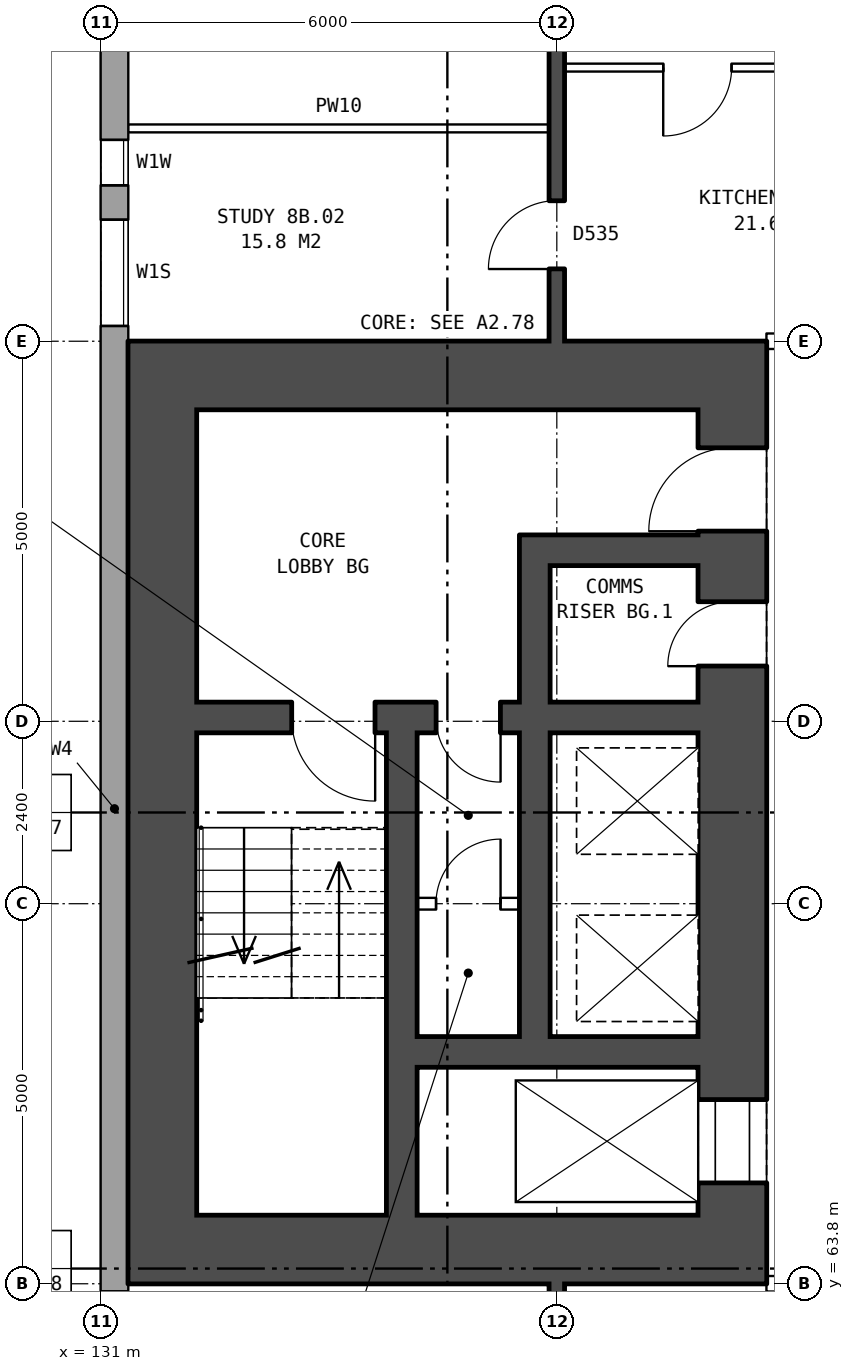
"""IFC4 building model, lengths in metres.
Left out: names, types, materials, properties, quantities, classifications, styles, units other than length and angle.
Written with IfcOpenShell. Run it as: python <this file> out.ifc"""

import sys

from ifc_helpers import new_model, si_unit, direction, frame, frame_2d, origin, place, context, subcontext, project, spatial, rectangle, extrude, element, fill, save


model = new_model("IFC4")
c1 = context("Model", 3, precision=1e-05, world=origin(), true_north=direction((0.0, 1.0)))
c2 = subcontext(c1, "Body", "Model", "MODEL_VIEW")
j1 = project(units=[si_unit("LENGTHUNIT", "METRE"), si_unit("PLANEANGLEUNIT", "RADIAN")], contexts=[c1])
p1 = place(None, origin())
s1 = spatial("IfcSite", under=j1, at=p1, CompositionType="ELEMENT")
p2 = place(p1, origin())
s2 = spatial("IfcBuilding", under=s1, at=p2, CompositionType="ELEMENT")
p3 = place(p2, frame((0.0, 0.0, 31.9)))
s3 = spatial("IfcBuildingStorey", under=s2, at=p3, CompositionType="ELEMENT", Elevation=31.9)
p4 = place(p3, frame((131.18, 82.925, 0.0), z_axis=(0.0, 0.0, 1.0), x_axis=(0.0, -1.0, 0.0)))
e1 = element("IfcWall", 1, at=p4, inside=s3, PredefinedType="STANDARD", context=c2, shape_type="SweptSolid", body=[
    extrude(rectangle(XDim=25.851, YDim=0.36, at=frame_2d((12.925, 0.0))), origin(), (0.0, 0.0, 1.0), 2.85),
])
p5 = place(p4, frame((0.3, 0.0, 0.8)))
e2 = element("IfcOpeningElement", 2, at=p5, cuts=e1, PredefinedType="OPENING", context=c2, shape_type="SweptSolid", body=[
    extrude(rectangle(XDim=1.4, YDim=1.8, at=frame_2d((0.7, 0.9))), frame((0.0, 0.19, 0.0), z_axis=(0.0, -1.0, 0.0), x_axis=(1.0, 0.0, 0.0)), (0.0, 0.0, 1.0), 0.38),
])
p6 = place(p4, frame((4.075, 0.0, 0.25)))
e3 = element("IfcOpeningElement", 3, at=p6, cuts=e1, PredefinedType="OPENING", context=c2, shape_type="SweptSolid", body=[
    extrude(rectangle(XDim=0.6, YDim=0.9, at=frame_2d((0.3, 0.45))), frame((0.0, 0.19, 0.0), z_axis=(0.0, -1.0, 0.0), x_axis=(1.0, 0.0, 0.0)), (0.0, 0.0, 1.0), 0.38),
])
p7 = place(p4, frame((19.225, 0.0, 1.6)))
e4 = element("IfcOpeningElement", 4, at=p7, cuts=e1, PredefinedType="OPENING", context=c2, shape_type="SweptSolid", body=[
    extrude(rectangle(XDim=1.4, YDim=0.9, at=frame_2d((0.7, 0.45))), frame((0.0, 0.19, 0.0), z_axis=(0.0, -1.0, 0.0), x_axis=(1.0, 0.0, 0.0)), (0.0, 0.0, 1.0), 0.38),
])
p8 = place(p4, frame((22.025, 0.0, 0.8)))
e5 = element("IfcOpeningElement", 5, at=p8, cuts=e1, PredefinedType="OPENING", context=c2, shape_type="SweptSolid", body=[
    extrude(rectangle(XDim=1.2, YDim=0.9, at=frame_2d((0.6, 0.45))), frame((0.0, 0.19, 0.0), z_axis=(0.0, -1.0, 0.0), x_axis=(1.0, 0.0, 0.0)), (0.0, 0.0, 1.0), 0.38),
])
p9 = place(p4, frame((2.0, 0.0, 0.8)))
e6 = element("IfcOpeningElement", 6, at=p9, cuts=e1, PredefinedType="OPENING", context=c2, shape_type="SweptSolid", body=[
    extrude(rectangle(XDim=0.8, YDim=1.5, at=frame_2d((0.4, 0.75))), frame((0.0, 0.19, 0.0), z_axis=(0.0, -1.0, 0.0), x_axis=(1.0, 0.0, 0.0)), (0.0, 0.0, 1.0), 0.38),
])
p10 = place(p4, frame((5.125, 0.0, 1.65)))
e7 = element("IfcOpeningElement", 7, at=p10, cuts=e1, PredefinedType="OPENING", context=c2, shape_type="SweptSolid", body=[
    extrude(rectangle(XDim=1.4, YDim=0.9, at=frame_2d((0.7, 0.45))), frame((0.0, 0.19, 0.0), z_axis=(0.0, -1.0, 0.0), x_axis=(1.0, 0.0, 0.0)), (0.0, 0.0, 1.0), 0.38),
])
p11 = place(p4, frame((23.575, 0.0, 0.8)))
e8 = element("IfcOpeningElement", 8, at=p11, cuts=e1, PredefinedType="OPENING", context=c2, shape_type="SweptSolid", body=[
    extrude(rectangle(XDim=1.2, YDim=1.8, at=frame_2d((0.6, 0.9))), frame((0.0, 0.19, 0.0), z_axis=(0.0, -1.0, 0.0), x_axis=(1.0, 0.0, 0.0)), (0.0, 0.0, 1.0), 0.38),
])
p12 = place(p3, frame((139.31, 64.7, 0.0), z_axis=(0.0, 0.0, 1.0), x_axis=(0.0, 1.0, 0.0)))
e9 = element("IfcWall", 9, at=p12, inside=s3, PredefinedType="SHEAR", context=c2, shape_type="SweptSolid", body=[
    extrude(rectangle(XDim=10.6, YDim=0.9, at=frame_2d((5.3, 0.0))), origin(), (0.0, 0.0, 1.0), 2.85),
])
p13 = place(p12, frame((0.425, 0.0, 0.0)))
e10 = element("IfcOpeningElement", 10, at=p13, cuts=e9, PredefinedType="OPENING", context=c2, shape_type="SweptSolid", body=[
    extrude(rectangle(XDim=1.1, YDim=2.1, at=frame_2d((0.55, 1.05))), frame((0.0, 0.46, 0.0), z_axis=(0.0, -1.0, 0.0), x_axis=(1.0, 0.0, 0.0)), (0.0, 0.0, 1.0), 0.92),
])
p14 = place(p12, frame((9.0, 0.0, 0.0)))
e11 = element("IfcOpeningElement", 11, at=p14, cuts=e9, PredefinedType="OPENING", context=c2, shape_type="SweptSolid", body=[
    extrude(rectangle(XDim=1.1, YDim=2.1, at=frame_2d((0.55, 1.05))), frame((0.0, 0.46, 0.0), z_axis=(0.0, -1.0, 0.0), x_axis=(1.0, 0.0, 0.0)), (0.0, 0.0, 1.0), 0.92),
])
p15 = place(p12, frame((7.225, 0.0, 0.0)))
e12 = element("IfcOpeningElement", 12, at=p15, cuts=e9, PredefinedType="OPENING", context=c2, shape_type="SweptSolid", body=[
    extrude(rectangle(XDim=0.85, YDim=2.1, at=frame_2d((0.425, 1.05))), frame((0.0, 0.46, 0.0), z_axis=(0.0, -1.0, 0.0), x_axis=(1.0, 0.0, 0.0)), (0.0, 0.0, 1.0), 0.92),
])
p16 = place(p3, frame((131.81, 64.7, 0.0), z_axis=(0.0, 0.0, 1.0), x_axis=(0.0, 1.0, 0.0)))
e13 = element("IfcWall", 13, at=p16, inside=s3, PredefinedType="SHEAR", context=c2, shape_type="SweptSolid", body=[
    extrude(rectangle(XDim=10.6, YDim=0.9, at=frame_2d((5.3, 0.0))), origin(), (0.0, 0.0, 1.0), 2.85),
])
for number, where, z_axis, x_axis in (
    (14, (139.76, 64.25, 0.0), (0.0, 0.0, 1.0), (-1.0, 0.0, 0.0)),
    (15, (139.76, 75.75, 0.0), (0.0, 0.0, 1.0), (-1.0, 0.0, 0.0)),
):
    element("IfcWall", number, at=place(p3, frame(where, z_axis=z_axis, x_axis=x_axis)), inside=s3, PredefinedType="SHEAR", context=c2, shape_type="SweptSolid", body=[
        extrude(rectangle(XDim=8.4, YDim=0.9, at=frame_2d((4.2, 0.0))), origin(), (0.0, 0.0, 1.0), 2.85),
    ])
p17 = place(p3, frame((138.86, 66.85, 0.0), z_axis=(0.0, 0.0, 1.0), x_axis=(-1.0, 0.0, 0.0)))
e16 = element("IfcWall", 16, at=p17, inside=s3, PredefinedType="SHEAR", context=c2, shape_type="SweptSolid", body=[
    extrude(rectangle(XDim=3.7, YDim=0.4, at=frame_2d((1.85, 0.0))), origin(), (0.0, 0.0, 1.0), 2.85),
])
p18 = place(p3, frame((136.51, 68.8, 0.0), z_axis=(0.0, 0.0, 1.0), x_axis=(-1.0, 0.0, 0.0)))
e17 = element("IfcWall", 17, at=p18, inside=s3, PredefinedType="PARTITIONING", context=c2, shape_type="SweptSolid", body=[
    extrude(rectangle(XDim=1.35, YDim=0.15, at=frame_2d((0.675, 0.0))), origin(), (0.0, 0.0, 1.0), 2.85),
])
p19 = place(p18, frame((0.25, 0.0, 0.0)))
e18 = element("IfcOpeningElement", 18, at=p19, cuts=e17, PredefinedType="OPENING", context=c2, shape_type="SweptSolid", body=[
    extrude(rectangle(XDim=0.85, YDim=2.1, at=frame_2d((0.425, 1.05))), frame((0.0, 0.085, 0.0), z_axis=(0.0, -1.0, 0.0), x_axis=(1.0, 0.0, 0.0)), (0.0, 0.0, 1.0), 0.17),
])
p20 = place(p3, frame((138.86, 71.25, 0.0), z_axis=(0.0, 0.0, 1.0), x_axis=(-1.0, 0.0, 0.0)))
e19 = element("IfcWall", 19, at=p20, inside=s3, PredefinedType="SHEAR", context=c2, shape_type="SweptSolid", body=[
    extrude(rectangle(XDim=6.6, YDim=0.4, at=frame_2d((3.3, 0.0))), origin(), (0.0, 0.0, 1.0), 2.85),
])
p21 = place(p20, frame((4.25, 0.0, 0.0)))
e20 = element("IfcOpeningElement", 20, at=p21, cuts=e19, PredefinedType="OPENING", context=c2, shape_type="SweptSolid", body=[
    extrude(rectangle(XDim=1.1, YDim=2.1, at=frame_2d((0.55, 1.05))), frame((0.0, 0.21, 0.0), z_axis=(0.0, -1.0, 0.0), x_axis=(1.0, 0.0, 0.0)), (0.0, 0.0, 1.0), 0.42),
])
p22 = place(p20, frame((2.6, 0.0, 0.0)))
e21 = element("IfcOpeningElement", 21, at=p22, cuts=e19, PredefinedType="OPENING", context=c2, shape_type="SweptSolid", body=[
    extrude(rectangle(XDim=0.85, YDim=2.1, at=frame_2d((0.425, 1.05))), frame((0.0, 0.21, 0.0), z_axis=(0.0, -1.0, 0.0), x_axis=(1.0, 0.0, 0.0)), (0.0, 0.0, 1.0), 0.42),
])
p23 = place(p3, frame((138.86, 73.45, 0.0), z_axis=(0.0, 0.0, 1.0), x_axis=(-1.0, 0.0, 0.0)))
e22 = element("IfcWall", 22, at=p23, inside=s3, PredefinedType="SHEAR", context=c2, shape_type="SweptSolid", body=[
    extrude(rectangle(XDim=1.95, YDim=0.4, at=frame_2d((0.975, 0.0))), origin(), (0.0, 0.0, 1.0), 2.85),
])
p24 = place(p3, frame((136.71, 67.05, 0.0), z_axis=(0.0, 0.0, 1.0), x_axis=(0.0, 1.0, 0.0)))
e23 = element("IfcWall", 23, at=p24, inside=s3, PredefinedType="SHEAR", context=c2, shape_type="SweptSolid", body=[
    extrude(rectangle(XDim=4.0, YDim=0.4, at=frame_2d((2.0, 0.0))), origin(), (0.0, 0.0, 1.0), 2.85),
])
p25 = place(p3, frame((136.71, 71.45, 0.0), z_axis=(0.0, 0.0, 1.0), x_axis=(0.0, 1.0, 0.0)))
e24 = element("IfcWall", 24, at=p25, inside=s3, PredefinedType="SHEAR", context=c2, shape_type="SweptSolid", body=[
    extrude(rectangle(XDim=2.2, YDim=0.4, at=frame_2d((1.1, 0.0))), origin(), (0.0, 0.0, 1.0), 2.85),
])
p26 = place(p3, frame((134.96, 64.7, 0.0), z_axis=(0.0, 0.0, 1.0), x_axis=(0.0, 1.0, 0.0)))
e25 = element("IfcWall", 25, at=p26, inside=s3, PredefinedType="SHEAR", context=c2, shape_type="SweptSolid", body=[
    extrude(rectangle(XDim=6.35, YDim=0.4, at=frame_2d((3.175, 0.0))), origin(), (0.0, 0.0, 1.0), 2.85),
])
p27 = place(p3, frame((139.76, 63.8, 0.0), z_axis=(0.0, 0.0, 1.0), x_axis=(1.0, 0.0, 0.0)))
e26 = element("IfcWall", 26, at=p27, inside=s3, PredefinedType="PARTITIONING", context=c2, shape_type="SweptSolid", body=[
    extrude(rectangle(XDim=3.0, YDim=0.2, at=frame_2d((1.5, 0.0))), origin(), (0.0, 0.0, 1.0), 2.85),
])
p28 = place(p27, frame((1.0, 0.0, 0.0)))
e27 = element("IfcOpeningElement", 27, at=p28, cuts=e26, PredefinedType="OPENING", context=c2, shape_type="SweptSolid", body=[
    extrude(rectangle(XDim=1.0, YDim=2.1, at=frame_2d((0.5, 1.05))), frame((0.0, 0.11, 0.0), z_axis=(0.0, -1.0, 0.0), x_axis=(1.0, 0.0, 0.0)), (0.0, 0.0, 1.0), 0.22),
])
p29 = place(p3, frame((139.76, 76.2, 0.0), z_axis=(0.0, 0.0, 1.0), x_axis=(1.0, 0.0, 0.0)))
e28 = element("IfcWall", 28, at=p29, inside=s3, PredefinedType="PARTITIONING", context=c2, shape_type="SweptSolid", body=[
    extrude(rectangle(XDim=3.0, YDim=0.2, at=frame_2d((1.5, 0.0))), origin(), (0.0, 0.0, 1.0), 2.85),
])
p30 = place(p29, frame((1.0, 0.0, 0.0)))
e29 = element("IfcOpeningElement", 29, at=p30, cuts=e28, PredefinedType="OPENING", context=c2, shape_type="SweptSolid", body=[
    extrude(rectangle(XDim=1.0, YDim=2.1, at=frame_2d((0.5, 1.05))), frame((0.0, 0.11, 0.0), z_axis=(0.0, -1.0, 0.0), x_axis=(1.0, 0.0, 0.0)), (0.0, 0.0, 1.0), 0.22),
])
p31 = place(p3, frame((131.36, 79.0, 0.0), z_axis=(0.0, 0.0, 1.0), x_axis=(1.0, 0.0, 0.0)))
e30 = element("IfcWall", 30, at=p31, inside=s3, PredefinedType="PARTITIONING", context=c2, shape_type="SweptSolid", body=[
    extrude(rectangle(XDim=5.54, YDim=0.1, at=frame_2d((2.77, 0.0))), origin(), (0.0, 0.0, 1.0), 2.85),
])
p32 = place(p3, frame((137.1, 79.8, 0.0), z_axis=(0.0, 0.0, 1.0), x_axis=(1.0, 0.0, 0.0)))
e31 = element("IfcWall", 31, at=p32, inside=s3, PredefinedType="PARTITIONING", context=c2, shape_type="SweptSolid", body=[
    extrude(rectangle(XDim=5.8, YDim=0.1, at=frame_2d((2.9, 0.0))), origin(), (0.0, 0.0, 1.0), 2.85),
])
p33 = place(p32, frame((1.3, 0.0, 0.0)))
e32 = element("IfcOpeningElement", 32, at=p33, cuts=e31, PredefinedType="OPENING", context=c2, shape_type="SweptSolid", body=[
    extrude(rectangle(XDim=0.9, YDim=2.1, at=frame_2d((0.45, 1.05))), frame((0.0, 0.06, 0.0), z_axis=(0.0, -1.0, 0.0), x_axis=(1.0, 0.0, 0.0)), (0.0, 0.0, 1.0), 0.12),
])
p34 = place(p32, frame((4.2, 0.0, 0.0)))
e33 = element("IfcOpeningElement", 33, at=p34, cuts=e31, PredefinedType="OPENING", context=c2, shape_type="SweptSolid", body=[
    extrude(rectangle(XDim=0.9, YDim=2.1, at=frame_2d((0.45, 1.05))), frame((0.0, 0.06, 0.0), z_axis=(0.0, -1.0, 0.0), x_axis=(1.0, 0.0, 0.0)), (0.0, 0.0, 1.0), 0.12),
])
p35 = place(p3, frame((137.0, 54.36, 0.0), z_axis=(0.0, 0.0, 1.0), x_axis=(0.0, 1.0, 0.0)))
e34 = element("IfcWall", 34, at=p35, inside=s3, PredefinedType="SOLIDWALL", context=c2, shape_type="SweptSolid", body=[
    extrude(rectangle(XDim=9.44, YDim=0.2, at=frame_2d((4.72, 0.0))), origin(), (0.0, 0.0, 1.0), 2.85),
])
p36 = place(p35, frame((7.04, 0.0, 0.0)))
e35 = element("IfcOpeningElement", 35, at=p36, cuts=e34, PredefinedType="OPENING", context=c2, shape_type="SweptSolid", body=[
    extrude(rectangle(XDim=0.9, YDim=2.1, at=frame_2d((0.45, 1.05))), frame((0.0, 0.11, 0.0), z_axis=(0.0, -1.0, 0.0), x_axis=(1.0, 0.0, 0.0)), (0.0, 0.0, 1.0), 0.22),
])
p37 = place(p3, frame((137.0, 76.2, 0.0), z_axis=(0.0, 0.0, 1.0), x_axis=(0.0, 1.0, 0.0)))
e36 = element("IfcWall", 36, at=p37, inside=s3, PredefinedType="SOLIDWALL", context=c2, shape_type="SweptSolid", body=[
    extrude(rectangle(XDim=9.44, YDim=0.2, at=frame_2d((4.72, 0.0))), origin(), (0.0, 0.0, 1.0), 2.85),
])
p38 = place(p37, frame((6.07, 0.0, 0.0)))
e37 = element("IfcOpeningElement", 37, at=p38, cuts=e36, PredefinedType="OPENING", context=c2, shape_type="SweptSolid", body=[
    extrude(rectangle(XDim=0.9, YDim=2.1, at=frame_2d((0.45, 1.05))), frame((0.0, 0.11, 0.0), z_axis=(0.0, -1.0, 0.0), x_axis=(1.0, 0.0, 0.0)), (0.0, 0.0, 1.0), 0.22),
])
p39 = place(p37, frame((0.95, 0.0, 0.0)))
e38 = element("IfcOpeningElement", 38, at=p39, cuts=e36, PredefinedType="OPENING", context=c2, shape_type="SweptSolid", body=[
    extrude(rectangle(XDim=0.9, YDim=2.1, at=frame_2d((0.45, 1.05))), frame((0.0, 0.11, 0.0), z_axis=(0.0, -1.0, 0.0), x_axis=(1.0, 0.0, 0.0)), (0.0, 0.0, 1.0), 0.22),
])
p40 = place(p6, origin())
e39 = element("IfcWindow", 39, at=p40, inside=s3, PartitioningType="SINGLE_PANEL", PredefinedType="WINDOW", context=c2, shape_type="SweptSolid", body=[
    extrude(rectangle(XDim=0.6, YDim=0.9, at=frame_2d((0.3, 0.45))), frame((0.0, 0.15, 0.0), z_axis=(0.0, -1.0, 0.0), x_axis=(1.0, 0.0, 0.0)), (0.0, 0.0, 1.0), 0.06),
])
fill(e3, e39)
p41 = place(p13, origin())
e40 = element("IfcDoor", 40, at=p41, inside=s3, OperationType="DOUBLE_DOOR_SLIDING", PredefinedType="DOOR", context=c2, shape_type="SweptSolid", body=[
    extrude(rectangle(XDim=1.1, YDim=2.1, at=frame_2d((0.55, 1.05))), frame((0.0, 0.435, 0.0), z_axis=(0.0, -1.0, 0.0), x_axis=(1.0, 0.0, 0.0)), (0.0, 0.0, 1.0), 0.05),
])
fill(e10, e40)
p42 = place(p14, origin())
e41 = element("IfcDoor", 41, at=p42, inside=s3, OperationType="SINGLE_SWING_LEFT", PredefinedType="DOOR", context=c2, shape_type="SweptSolid", body=[
    extrude(rectangle(XDim=1.1, YDim=2.1, at=frame_2d((0.55, 1.05))), frame((0.0, 0.435, 0.0), z_axis=(0.0, -1.0, 0.0), x_axis=(1.0, 0.0, 0.0)), (0.0, 0.0, 1.0), 0.05),
])
fill(e11, e41)
p43 = place(p21, origin())
e42 = element("IfcDoor", 42, at=p43, inside=s3, OperationType="SINGLE_SWING_LEFT", PredefinedType="DOOR", context=c2, shape_type="SweptSolid", body=[
    extrude(rectangle(XDim=1.1, YDim=2.1, at=frame_2d((0.55, 1.05))), frame((0.0, 0.025, 0.0), z_axis=(0.0, -1.0, 0.0), x_axis=(1.0, 0.0, 0.0)), (0.0, 0.0, 1.0), 0.05),
])
fill(e20, e42)
p44 = place(p15, origin())
e43 = element("IfcDoor", 43, at=p44, inside=s3, OperationType="SINGLE_SWING_LEFT", PredefinedType="DOOR", context=c2, shape_type="SweptSolid", body=[
    extrude(rectangle(XDim=0.85, YDim=2.1, at=frame_2d((0.425, 1.05))), frame((0.0, 0.435, 0.0), z_axis=(0.0, -1.0, 0.0), x_axis=(1.0, 0.0, 0.0)), (0.0, 0.0, 1.0), 0.05),
])
fill(e12, e43)
p45 = place(p22, origin())
e44 = element("IfcDoor", 44, at=p45, inside=s3, OperationType="SINGLE_SWING_LEFT", PredefinedType="DOOR", context=c2, shape_type="SweptSolid", body=[
    extrude(rectangle(XDim=0.85, YDim=2.1, at=frame_2d((0.425, 1.05))), frame((0.0, 0.025, 0.0), z_axis=(0.0, -1.0, 0.0), x_axis=(1.0, 0.0, 0.0)), (0.0, 0.0, 1.0), 0.05),
])
fill(e21, e44)
p46 = place(p19, frame((0.85, 0.0, 0.0), z_axis=(0.0, 0.0, 1.0), x_axis=(-1.0, 0.0, 0.0)))
e45 = element("IfcDoor", 45, at=p46, inside=s3, OperationType="SINGLE_SWING_RIGHT", PredefinedType="DOOR", context=c2, shape_type="SweptSolid", body=[
    extrude(rectangle(XDim=0.85, YDim=2.1, at=frame_2d((0.425, 1.05))), frame((0.0, 0.025, 0.0), z_axis=(0.0, -1.0, 0.0), x_axis=(1.0, 0.0, 0.0)), (0.0, 0.0, 1.0), 0.05),
])
fill(e18, e45)
p47 = place(p39, origin())
e46 = element("IfcDoor", 46, at=p47, inside=s3, OperationType="SINGLE_SWING_LEFT", PredefinedType="DOOR", context=c2, shape_type="SweptSolid", body=[
    extrude(rectangle(XDim=0.9, YDim=2.1, at=frame_2d((0.45, 1.05))), frame((0.0, 0.025, 0.0), z_axis=(0.0, -1.0, 0.0), x_axis=(1.0, 0.0, 0.0)), (0.0, 0.0, 1.0), 0.05),
])
fill(e38, e46)
p48 = place(p33, frame((0.9, 0.0, 0.0), z_axis=(0.0, 0.0, 1.0), x_axis=(-1.0, 0.0, 0.0)))
e47 = element("IfcDoor", 47, at=p48, inside=s3, OperationType="SINGLE_SWING_RIGHT", PredefinedType="DOOR", context=c2, shape_type="SweptSolid", body=[
    extrude(rectangle(XDim=0.9, YDim=2.1, at=frame_2d((0.45, 1.05))), frame((0.0, 0.025, 0.0), z_axis=(0.0, -1.0, 0.0), x_axis=(1.0, 0.0, 0.0)), (0.0, 0.0, 1.0), 0.05),
])
fill(e32, e47)
p49 = place(p10, origin())
e48 = element("IfcWindow", 48, at=p49, inside=s3, PartitioningType="SINGLE_PANEL", PredefinedType="WINDOW", context=c2, shape_type="SweptSolid", body=[
    extrude(rectangle(XDim=1.4, YDim=0.9, at=frame_2d((0.7, 0.45))), frame((0.0, 0.15, 0.0), z_axis=(0.0, -1.0, 0.0), x_axis=(1.0, 0.0, 0.0)), (0.0, 0.0, 1.0), 0.06),
])
fill(e7, e48)
save(model, sys.argv[1])
